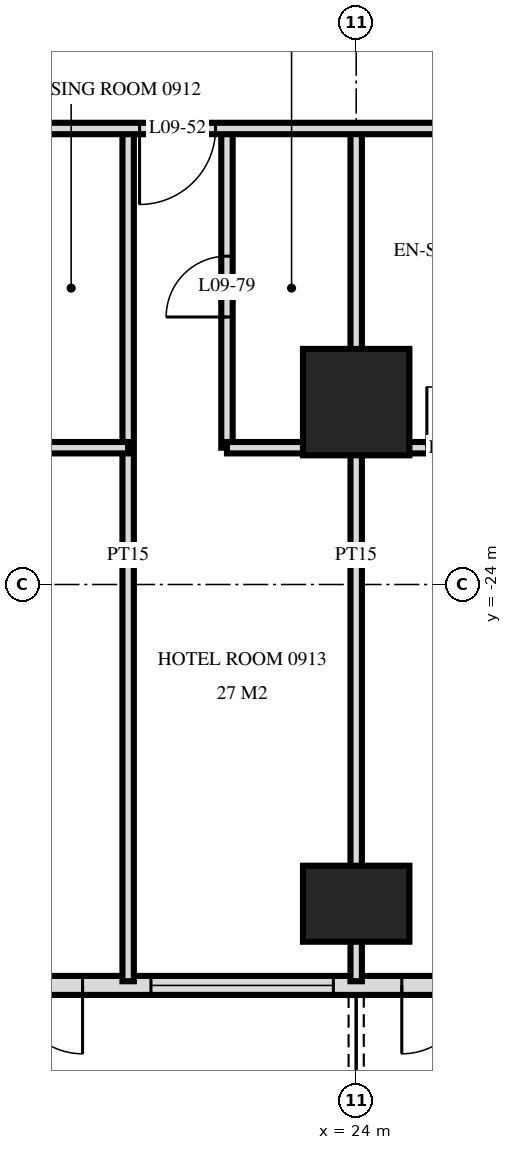
"""IFC4 building model, lengths in metres.
Left out: names, types, materials, properties, quantities, classifications, styles, units other than length and angle.
Written with IfcOpenShell. Run it as: python <this file> out.ifc"""

import sys

from ifc_helpers import new_model, si_unit, direction, frame, frame_2d, origin, origin_2d, place, context, subcontext, project, spatial, rectangle, extrude, element, fill, save


model = new_model("IFC4")
c1 = context("Model", 3, precision=1e-05, world=origin(), true_north=direction((0.0, 1.0)))
c2 = subcontext(c1, "Body", "Model", "MODEL_VIEW")
j1 = project(units=[si_unit("LENGTHUNIT", "METRE"), si_unit("PLANEANGLEUNIT", "RADIAN")], contexts=[c1])
p1 = place(None, origin())
s1 = spatial("IfcSite", under=j1, at=p1, CompositionType="ELEMENT")
p2 = place(p1, origin())
s2 = spatial("IfcBuilding", under=s1, at=p2, CompositionType="ELEMENT")
p3 = place(p2, frame((0.0, 0.0, 42.0)))
s3 = spatial("IfcBuildingStorey", under=s2, at=p3, CompositionType="ELEMENT", Elevation=42.0)
p4 = place(p3, frame((24.0, -28.2, 0.0), z_axis=(0.0, 0.0, 1.0), x_axis=(1.0, 0.0, 0.0)))
e1 = element("IfcColumn", 1, at=p4, inside=s3, PredefinedType="COLUMN", context=c2, shape_type="SweptSolid", body=[
    extrude(rectangle(XDim=1.4, YDim=1.0, at=origin_2d()), origin(), (0.0, 0.0, 1.0), 3.6),
])
p5 = place(p3, frame((24.0, -21.6, 0.0), z_axis=(0.0, 0.0, 1.0), x_axis=(1.0, 0.0, 0.0)))
e2 = element("IfcColumn", 2, at=p5, inside=s3, PredefinedType="COLUMN", context=c2, shape_type="SweptSolid", body=[
    extrude(rectangle(XDim=1.4, YDim=1.4, at=origin_2d()), origin(), (0.0, 0.0, 1.0), 3.6),
])
p6 = place(p3, frame((-28.775, -29.275, 0.0), z_axis=(0.0, 0.0, 1.0), x_axis=(1.0, 0.0, 0.0)))
e3 = element("IfcWall", 3, at=p6, inside=s3, PredefinedType="SOLIDWALL", context=c2, shape_type="SweptSolid", body=[
    extrude(rectangle(XDim=57.551, YDim=0.25, at=frame_2d((28.775, 0.0))), origin(), (0.0, 0.0, 1.0), 3.32),
])
p7 = place(p6, frame((0.575, 0.0, 0.0)))
e4 = element("IfcOpeningElement", 4, at=p7, cuts=e3, PredefinedType="OPENING", context=c2, shape_type="SweptSolid", body=[
    extrude(rectangle(XDim=1.8, YDim=2.4, at=frame_2d((0.9, 1.2))), frame((0.0, 0.135, 0.0), z_axis=(0.0, -1.0, 0.0), x_axis=(1.0, 0.0, 0.0)), (0.0, 0.0, 1.0), 0.27),
])
p8 = place(p6, frame((5.375, 0.0, 0.0)))
e5 = element("IfcOpeningElement", 5, at=p8, cuts=e3, PredefinedType="OPENING", context=c2, shape_type="SweptSolid", body=[
    extrude(rectangle(XDim=1.8, YDim=2.4, at=frame_2d((0.9, 1.2))), frame((0.0, 0.135, 0.0), z_axis=(0.0, -1.0, 0.0), x_axis=(1.0, 0.0, 0.0)), (0.0, 0.0, 1.0), 0.27),
])
p9 = place(p6, frame((8.075, 0.0, 0.3)))
e6 = element("IfcOpeningElement", 6, at=p9, cuts=e3, PredefinedType="OPENING", context=c2, shape_type="SweptSolid", body=[
    extrude(rectangle(XDim=2.4, YDim=2.1, at=frame_2d((1.2, 1.05))), frame((0.0, 0.135, 0.0), z_axis=(0.0, -1.0, 0.0), x_axis=(1.0, 0.0, 0.0)), (0.0, 0.0, 1.0), 0.27),
])
p10 = place(p6, frame((11.375, 0.0, 0.0)))
e7 = element("IfcOpeningElement", 7, at=p10, cuts=e3, PredefinedType="OPENING", context=c2, shape_type="SweptSolid", body=[
    extrude(rectangle(XDim=1.8, YDim=2.4, at=frame_2d((0.9, 1.2))), frame((0.0, 0.135, 0.0), z_axis=(0.0, -1.0, 0.0), x_axis=(1.0, 0.0, 0.0)), (0.0, 0.0, 1.0), 0.27),
])
p11 = place(p6, frame((14.075, 0.0, 0.3)))
e8 = element("IfcOpeningElement", 8, at=p11, cuts=e3, PredefinedType="OPENING", context=c2, shape_type="SweptSolid", body=[
    extrude(rectangle(XDim=2.4, YDim=2.1, at=frame_2d((1.2, 1.05))), frame((0.0, 0.135, 0.0), z_axis=(0.0, -1.0, 0.0), x_axis=(1.0, 0.0, 0.0)), (0.0, 0.0, 1.0), 0.27),
])
p12 = place(p6, frame((17.375, 0.0, 0.0)))
e9 = element("IfcOpeningElement", 9, at=p12, cuts=e3, PredefinedType="OPENING", context=c2, shape_type="SweptSolid", body=[
    extrude(rectangle(XDim=1.8, YDim=2.4, at=frame_2d((0.9, 1.2))), frame((0.0, 0.135, 0.0), z_axis=(0.0, -1.0, 0.0), x_axis=(1.0, 0.0, 0.0)), (0.0, 0.0, 1.0), 0.27),
])
p13 = place(p6, frame((20.075, 0.0, 0.3)))
e10 = element("IfcOpeningElement", 10, at=p13, cuts=e3, PredefinedType="OPENING", context=c2, shape_type="SweptSolid", body=[
    extrude(rectangle(XDim=2.4, YDim=2.1, at=frame_2d((1.2, 1.05))), frame((0.0, 0.135, 0.0), z_axis=(0.0, -1.0, 0.0), x_axis=(1.0, 0.0, 0.0)), (0.0, 0.0, 1.0), 0.27),
])
p14 = place(p6, frame((23.075, 0.0, 0.3)))
e11 = element("IfcOpeningElement", 11, at=p14, cuts=e3, PredefinedType="OPENING", context=c2, shape_type="SweptSolid", body=[
    extrude(rectangle(XDim=2.4, YDim=2.1, at=frame_2d((1.2, 1.05))), frame((0.0, 0.135, 0.0), z_axis=(0.0, -1.0, 0.0), x_axis=(1.0, 0.0, 0.0)), (0.0, 0.0, 1.0), 0.27),
])
p15 = place(p6, frame((26.375, 0.0, 0.0)))
e12 = element("IfcOpeningElement", 12, at=p15, cuts=e3, PredefinedType="OPENING", context=c2, shape_type="SweptSolid", body=[
    extrude(rectangle(XDim=1.8, YDim=2.4, at=frame_2d((0.9, 1.2))), frame((0.0, 0.135, 0.0), z_axis=(0.0, -1.0, 0.0), x_axis=(1.0, 0.0, 0.0)), (0.0, 0.0, 1.0), 0.27),
])
p16 = place(p6, frame((29.375, 0.0, 0.0)))
e13 = element("IfcOpeningElement", 13, at=p16, cuts=e3, PredefinedType="OPENING", context=c2, shape_type="SweptSolid", body=[
    extrude(rectangle(XDim=1.8, YDim=2.4, at=frame_2d((0.9, 1.2))), frame((0.0, 0.135, 0.0), z_axis=(0.0, -1.0, 0.0), x_axis=(1.0, 0.0, 0.0)), (0.0, 0.0, 1.0), 0.27),
])
p17 = place(p6, frame((32.075, 0.0, 0.3)))
e14 = element("IfcOpeningElement", 14, at=p17, cuts=e3, PredefinedType="OPENING", context=c2, shape_type="SweptSolid", body=[
    extrude(rectangle(XDim=2.4, YDim=2.1, at=frame_2d((1.2, 1.05))), frame((0.0, 0.135, 0.0), z_axis=(0.0, -1.0, 0.0), x_axis=(1.0, 0.0, 0.0)), (0.0, 0.0, 1.0), 0.27),
])
p18 = place(p6, frame((35.375, 0.0, 0.0)))
e15 = element("IfcOpeningElement", 15, at=p18, cuts=e3, PredefinedType="OPENING", context=c2, shape_type="SweptSolid", body=[
    extrude(rectangle(XDim=1.8, YDim=2.4, at=frame_2d((0.9, 1.2))), frame((0.0, 0.135, 0.0), z_axis=(0.0, -1.0, 0.0), x_axis=(1.0, 0.0, 0.0)), (0.0, 0.0, 1.0), 0.27),
])
p19 = place(p6, frame((38.075, 0.0, 0.3)))
e16 = element("IfcOpeningElement", 16, at=p19, cuts=e3, PredefinedType="OPENING", context=c2, shape_type="SweptSolid", body=[
    extrude(rectangle(XDim=2.4, YDim=2.1, at=frame_2d((1.2, 1.05))), frame((0.0, 0.135, 0.0), z_axis=(0.0, -1.0, 0.0), x_axis=(1.0, 0.0, 0.0)), (0.0, 0.0, 1.0), 0.27),
])
p20 = place(p6, frame((41.375, 0.0, 0.0)))
e17 = element("IfcOpeningElement", 17, at=p20, cuts=e3, PredefinedType="OPENING", context=c2, shape_type="SweptSolid", body=[
    extrude(rectangle(XDim=1.8, YDim=2.4, at=frame_2d((0.9, 1.2))), frame((0.0, 0.135, 0.0), z_axis=(0.0, -1.0, 0.0), x_axis=(1.0, 0.0, 0.0)), (0.0, 0.0, 1.0), 0.27),
])
p21 = place(p6, frame((44.075, 0.0, 0.3)))
e18 = element("IfcOpeningElement", 18, at=p21, cuts=e3, PredefinedType="OPENING", context=c2, shape_type="SweptSolid", body=[
    extrude(rectangle(XDim=2.4, YDim=2.1, at=frame_2d((1.2, 1.05))), frame((0.0, 0.135, 0.0), z_axis=(0.0, -1.0, 0.0), x_axis=(1.0, 0.0, 0.0)), (0.0, 0.0, 1.0), 0.27),
])
p22 = place(p6, frame((47.375, 0.0, 0.0)))
e19 = element("IfcOpeningElement", 19, at=p22, cuts=e3, PredefinedType="OPENING", context=c2, shape_type="SweptSolid", body=[
    extrude(rectangle(XDim=1.8, YDim=2.4, at=frame_2d((0.9, 1.2))), frame((0.0, 0.135, 0.0), z_axis=(0.0, -1.0, 0.0), x_axis=(1.0, 0.0, 0.0)), (0.0, 0.0, 1.0), 0.27),
])
p23 = place(p6, frame((50.075, 0.0, 0.3)))
e20 = element("IfcOpeningElement", 20, at=p23, cuts=e3, PredefinedType="OPENING", context=c2, shape_type="SweptSolid", body=[
    extrude(rectangle(XDim=2.4, YDim=2.1, at=frame_2d((1.2, 1.05))), frame((0.0, 0.135, 0.0), z_axis=(0.0, -1.0, 0.0), x_axis=(1.0, 0.0, 0.0)), (0.0, 0.0, 1.0), 0.27),
])
p24 = place(p6, frame((53.375, 0.0, 0.0)))
e21 = element("IfcOpeningElement", 21, at=p24, cuts=e3, PredefinedType="OPENING", context=c2, shape_type="SweptSolid", body=[
    extrude(rectangle(XDim=1.8, YDim=2.4, at=frame_2d((0.9, 1.2))), frame((0.0, 0.135, 0.0), z_axis=(0.0, -1.0, 0.0), x_axis=(1.0, 0.0, 0.0)), (0.0, 0.0, 1.0), 0.27),
])
p25 = place(p3, frame((24.0, -29.22, 0.0), z_axis=(0.0, 0.0, 1.0), x_axis=(0.0, 1.0, 0.0)))
e22 = element("IfcWall", 22, at=p25, inside=s3, PredefinedType="PARTITIONING", context=c2, shape_type="SweptSolid", body=[
    extrude(rectangle(XDim=11.22, YDim=0.15, at=frame_2d((5.61, 0.0))), origin(), (0.0, 0.0, 1.0), 3.32),
])
p26 = place(p3, frame((22.3, -22.2, 0.0), z_axis=(0.0, 0.0, 1.0), x_axis=(0.0, 1.0, 0.0)))
e23 = element("IfcWall", 23, at=p26, inside=s3, PredefinedType="PARTITIONING", context=c2, shape_type="SweptSolid", body=[
    extrude(rectangle(XDim=4.2, YDim=0.15, at=frame_2d((2.1, 0.0))), origin(), (0.0, 0.0, 1.0), 3.32),
])
p27 = place(p26, frame((1.72, 0.0, 0.0)))
e24 = element("IfcOpeningElement", 24, at=p27, cuts=e23, PredefinedType="OPENING", context=c2, shape_type="SweptSolid", body=[
    extrude(rectangle(XDim=0.8, YDim=2.1, at=frame_2d((0.4, 1.05))), frame((0.0, 0.085, 0.0), z_axis=(0.0, -1.0, 0.0), x_axis=(1.0, 0.0, 0.0)), (0.0, 0.0, 1.0), 0.17),
])
p28 = place(p3, frame((21.0, -29.22, 0.0), z_axis=(0.0, 0.0, 1.0), x_axis=(0.0, 1.0, 0.0)))
e25 = element("IfcWall", 25, at=p28, inside=s3, PredefinedType="PARTITIONING", context=c2, shape_type="SweptSolid", body=[
    extrude(rectangle(XDim=11.22, YDim=0.15, at=frame_2d((5.61, 0.0))), origin(), (0.0, 0.0, 1.0), 3.32),
])
p29 = place(p3, frame((19.5, -22.2, 0.0), z_axis=(0.0, 0.0, 1.0), x_axis=(1.0, 0.0, 0.0)))
e26 = element("IfcWall", 26, at=p29, inside=s3, PredefinedType="PARTITIONING", context=c2, shape_type="SweptSolid", body=[
    extrude(rectangle(XDim=1.5, YDim=0.15, at=frame_2d((0.75, 0.0))), origin(), (0.0, 0.0, 1.0), 3.32),
])
p30 = place(p3, frame((22.3, -22.2, 0.0), z_axis=(0.0, 0.0, 1.0), x_axis=(1.0, 0.0, 0.0)))
e27 = element("IfcWall", 27, at=p30, inside=s3, PredefinedType="PARTITIONING", context=c2, shape_type="SweptSolid", body=[
    extrude(rectangle(XDim=5.9, YDim=0.15, at=frame_2d((2.95, 0.0))), origin(), (0.0, 0.0, 1.0), 3.32),
])
p31 = place(p30, frame((2.63, 0.0, 0.0)))
e28 = element("IfcOpeningElement", 28, at=p31, cuts=e27, PredefinedType="OPENING", context=c2, shape_type="SweptSolid", body=[
    extrude(rectangle(XDim=0.8, YDim=2.1, at=frame_2d((0.4, 1.05))), frame((0.0, 0.085, 0.0), z_axis=(0.0, -1.0, 0.0), x_axis=(1.0, 0.0, 0.0)), (0.0, 0.0, 1.0), 0.17),
])
p32 = place(p3, frame((-33.12, -18.0, 0.0), z_axis=(0.0, 0.0, 1.0), x_axis=(1.0, 0.0, 0.0)))
e29 = element("IfcWall", 29, at=p32, inside=s3, PredefinedType="PARTITIONING", context=c2, shape_type="SweptSolid", body=[
    extrude(rectangle(XDim=66.24, YDim=0.15, at=frame_2d((33.12, 0.0))), origin(), (0.0, 0.0, 1.0), 3.32),
])
p33 = place(p32, frame((12.27, 0.0, 0.0)))
e30 = element("IfcOpeningElement", 30, at=p33, cuts=e29, PredefinedType="OPENING", context=c2, shape_type="SweptSolid", body=[
    extrude(rectangle(XDim=1.0, YDim=2.1, at=frame_2d((0.5, 1.05))), frame((0.0, 0.085, 0.0), z_axis=(0.0, -1.0, 0.0), x_axis=(1.0, 0.0, 0.0)), (0.0, 0.0, 1.0), 0.17),
])
p34 = place(p32, frame((16.97, 0.0, 0.0)))
e31 = element("IfcOpeningElement", 31, at=p34, cuts=e29, PredefinedType="OPENING", context=c2, shape_type="SweptSolid", body=[
    extrude(rectangle(XDim=1.0, YDim=2.1, at=frame_2d((0.5, 1.05))), frame((0.0, 0.085, 0.0), z_axis=(0.0, -1.0, 0.0), x_axis=(1.0, 0.0, 0.0)), (0.0, 0.0, 1.0), 0.17),
])
p35 = place(p32, frame((18.27, 0.0, 0.0)))
e32 = element("IfcOpeningElement", 32, at=p35, cuts=e29, PredefinedType="OPENING", context=c2, shape_type="SweptSolid", body=[
    extrude(rectangle(XDim=1.0, YDim=2.1, at=frame_2d((0.5, 1.05))), frame((0.0, 0.085, 0.0), z_axis=(0.0, -1.0, 0.0), x_axis=(1.0, 0.0, 0.0)), (0.0, 0.0, 1.0), 0.17),
])
p36 = place(p32, frame((22.97, 0.0, 0.0)))
e33 = element("IfcOpeningElement", 33, at=p36, cuts=e29, PredefinedType="OPENING", context=c2, shape_type="SweptSolid", body=[
    extrude(rectangle(XDim=1.0, YDim=2.1, at=frame_2d((0.5, 1.05))), frame((0.0, 0.085, 0.0), z_axis=(0.0, -1.0, 0.0), x_axis=(1.0, 0.0, 0.0)), (0.0, 0.0, 1.0), 0.17),
])
p37 = place(p32, frame((24.27, 0.0, 0.0)))
e34 = element("IfcOpeningElement", 34, at=p37, cuts=e29, PredefinedType="OPENING", context=c2, shape_type="SweptSolid", body=[
    extrude(rectangle(XDim=1.0, YDim=2.1, at=frame_2d((0.5, 1.05))), frame((0.0, 0.085, 0.0), z_axis=(0.0, -1.0, 0.0), x_axis=(1.0, 0.0, 0.0)), (0.0, 0.0, 1.0), 0.17),
])
p38 = place(p32, frame((28.97, 0.0, 0.0)))
e35 = element("IfcOpeningElement", 35, at=p38, cuts=e29, PredefinedType="OPENING", context=c2, shape_type="SweptSolid", body=[
    extrude(rectangle(XDim=1.0, YDim=2.1, at=frame_2d((0.5, 1.05))), frame((0.0, 0.085, 0.0), z_axis=(0.0, -1.0, 0.0), x_axis=(1.0, 0.0, 0.0)), (0.0, 0.0, 1.0), 0.17),
])
p39 = place(p32, frame((30.27, 0.0, 0.0)))
e36 = element("IfcOpeningElement", 36, at=p39, cuts=e29, PredefinedType="OPENING", context=c2, shape_type="SweptSolid", body=[
    extrude(rectangle(XDim=1.0, YDim=2.1, at=frame_2d((0.5, 1.05))), frame((0.0, 0.085, 0.0), z_axis=(0.0, -1.0, 0.0), x_axis=(1.0, 0.0, 0.0)), (0.0, 0.0, 1.0), 0.17),
])
p40 = place(p32, frame((34.97, 0.0, 0.0)))
e37 = element("IfcOpeningElement", 37, at=p40, cuts=e29, PredefinedType="OPENING", context=c2, shape_type="SweptSolid", body=[
    extrude(rectangle(XDim=1.0, YDim=2.1, at=frame_2d((0.5, 1.05))), frame((0.0, 0.085, 0.0), z_axis=(0.0, -1.0, 0.0), x_axis=(1.0, 0.0, 0.0)), (0.0, 0.0, 1.0), 0.17),
])
p41 = place(p32, frame((37.27, 0.0, 0.0)))
e38 = element("IfcOpeningElement", 38, at=p41, cuts=e29, PredefinedType="OPENING", context=c2, shape_type="SweptSolid", body=[
    extrude(rectangle(XDim=1.0, YDim=2.1, at=frame_2d((0.5, 1.05))), frame((0.0, 0.085, 0.0), z_axis=(0.0, -1.0, 0.0), x_axis=(1.0, 0.0, 0.0)), (0.0, 0.0, 1.0), 0.17),
])
p42 = place(p32, frame((43.97, 0.0, 0.0)))
e39 = element("IfcOpeningElement", 39, at=p42, cuts=e29, PredefinedType="OPENING", context=c2, shape_type="SweptSolid", body=[
    extrude(rectangle(XDim=1.0, YDim=2.1, at=frame_2d((0.5, 1.05))), frame((0.0, 0.085, 0.0), z_axis=(0.0, -1.0, 0.0), x_axis=(1.0, 0.0, 0.0)), (0.0, 0.0, 1.0), 0.17),
])
p43 = place(p32, frame((45.27, 0.0, 0.0)))
e40 = element("IfcOpeningElement", 40, at=p43, cuts=e29, PredefinedType="OPENING", context=c2, shape_type="SweptSolid", body=[
    extrude(rectangle(XDim=1.0, YDim=2.1, at=frame_2d((0.5, 1.05))), frame((0.0, 0.085, 0.0), z_axis=(0.0, -1.0, 0.0), x_axis=(1.0, 0.0, 0.0)), (0.0, 0.0, 1.0), 0.17),
])
p44 = place(p32, frame((51.22, 0.0, 0.0)))
e41 = element("IfcOpeningElement", 41, at=p44, cuts=e29, PredefinedType="OPENING", context=c2, shape_type="SweptSolid", body=[
    extrude(rectangle(XDim=1.0, YDim=2.1, at=frame_2d((0.5, 1.05))), frame((0.0, 0.085, 0.0), z_axis=(0.0, -1.0, 0.0), x_axis=(1.0, 0.0, 0.0)), (0.0, 0.0, 1.0), 0.17),
])
p45 = place(p32, frame((54.27, 0.0, 0.0)))
e42 = element("IfcOpeningElement", 42, at=p45, cuts=e29, PredefinedType="OPENING", context=c2, shape_type="SweptSolid", body=[
    extrude(rectangle(XDim=1.0, YDim=2.1, at=frame_2d((0.5, 1.05))), frame((0.0, 0.085, 0.0), z_axis=(0.0, -1.0, 0.0), x_axis=(1.0, 0.0, 0.0)), (0.0, 0.0, 1.0), 0.17),
])
p46 = place(p32, frame((6.07, 0.0, 0.0)))
e43 = element("IfcOpeningElement", 43, at=p46, cuts=e29, PredefinedType="OPENING", context=c2, shape_type="SweptSolid", body=[
    extrude(rectangle(XDim=1.0, YDim=2.1, at=frame_2d((0.5, 1.05))), frame((0.0, 0.085, 0.0), z_axis=(0.0, -1.0, 0.0), x_axis=(1.0, 0.0, 0.0)), (0.0, 0.0, 1.0), 0.17),
])
p47 = place(p32, frame((63.37, 0.0, 0.0)))
e44 = element("IfcOpeningElement", 44, at=p47, cuts=e29, PredefinedType="OPENING", context=c2, shape_type="SweptSolid", body=[
    extrude(rectangle(XDim=1.0, YDim=2.1, at=frame_2d((0.5, 1.05))), frame((0.0, 0.085, 0.0), z_axis=(0.0, -1.0, 0.0), x_axis=(1.0, 0.0, 0.0)), (0.0, 0.0, 1.0), 0.17),
])
p48 = place(p22, frame((0.9, 0.0, 0.0), z_axis=(0.0, 0.0, 1.0), x_axis=(-1.0, 0.0, 0.0)))
e45 = element("IfcDoor", 45, at=p48, inside=s3, OperationType="DOUBLE_DOOR_SINGLE_SWING", PredefinedType="DOOR", context=c2, shape_type="SweptSolid", body=[
    extrude(rectangle(XDim=1.8, YDim=2.4, at=frame_2d((0.0, 1.2))), frame((0.0, -0.025, 0.0), z_axis=(0.0, 1.0, 0.0), x_axis=(-1.0, 0.0, 0.0)), (0.0, 0.0, 1.0), 0.05),
])
fill(e19, e45)
p49 = place(p23, origin())
e46 = element("IfcWindow", 46, at=p49, inside=s3, PartitioningType="SINGLE_PANEL", PredefinedType="WINDOW", context=c2, shape_type="SweptSolid", body=[
    extrude(rectangle(XDim=2.4, YDim=2.1, at=frame_2d((1.2, 1.05))), frame((0.0, 0.03, 0.0), z_axis=(0.0, -1.0, 0.0), x_axis=(1.0, 0.0, 0.0)), (0.0, 0.0, 1.0), 0.06),
])
fill(e20, e46)
p50 = place(p24, frame((0.9, 0.0, 0.0), z_axis=(0.0, 0.0, 1.0), x_axis=(-1.0, 0.0, 0.0)))
e47 = element("IfcDoor", 47, at=p50, inside=s3, OperationType="DOUBLE_DOOR_SINGLE_SWING", PredefinedType="DOOR", context=c2, shape_type="SweptSolid", body=[
    extrude(rectangle(XDim=1.8, YDim=2.4, at=frame_2d((0.0, 1.2))), frame((0.0, -0.025, 0.0), z_axis=(0.0, 1.0, 0.0), x_axis=(-1.0, 0.0, 0.0)), (0.0, 0.0, 1.0), 0.05),
])
fill(e21, e47)
p51 = place(p45, frame((0.5, 0.0, 0.0), z_axis=(0.0, 0.0, 1.0), x_axis=(-1.0, 0.0, 0.0)))
e48 = element("IfcDoor", 48, at=p51, inside=s3, OperationType="SINGLE_SWING_LEFT", PredefinedType="DOOR", context=c2, shape_type="SweptSolid", body=[
    extrude(rectangle(XDim=1.0, YDim=2.1, at=frame_2d((0.0, 1.05))), frame((0.0, -0.025, 0.0), z_axis=(0.0, 1.0, 0.0), x_axis=(-1.0, 0.0, 0.0)), (0.0, 0.0, 1.0), 0.05),
])
fill(e42, e48)
p52 = place(p27, origin())
e49 = element("IfcDoor", 49, at=p52, inside=s3, OperationType="SINGLE_SWING_RIGHT", PredefinedType="DOOR", context=c2, shape_type="SweptSolid", body=[
    extrude(rectangle(XDim=0.8, YDim=2.1, at=frame_2d((0.4, 1.05))), frame((0.0, 0.025, 0.0), z_axis=(0.0, -1.0, 0.0), x_axis=(1.0, 0.0, 0.0)), (0.0, 0.0, 1.0), 0.05),
])
fill(e24, e49)
p53 = place(p31, origin())
e50 = element("IfcDoor", 50, at=p53, inside=s3, OperationType="SINGLE_SWING_RIGHT", PredefinedType="DOOR", context=c2, shape_type="SweptSolid", body=[
    extrude(rectangle(XDim=0.8, YDim=2.1, at=frame_2d((0.4, 1.05))), frame((0.0, 0.025, 0.0), z_axis=(0.0, -1.0, 0.0), x_axis=(1.0, 0.0, 0.0)), (0.0, 0.0, 1.0), 0.05),
])
fill(e28, e50)
save(model, sys.argv[1])
